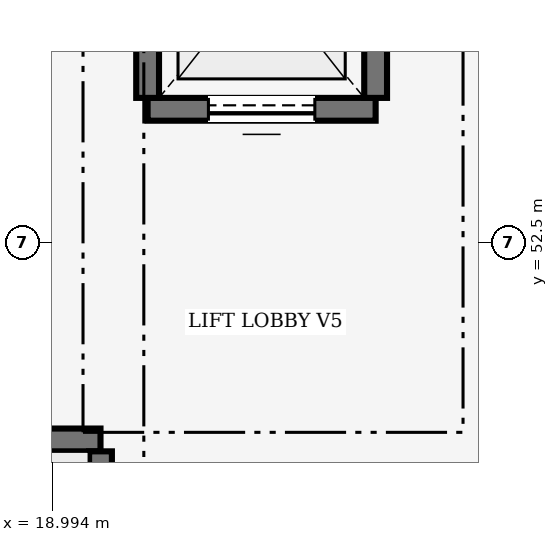
"""IFC4 building model, lengths in metres.
Left out: names, types, materials, properties, quantities, classifications, styles, units other than length and angle.
Written with IfcOpenShell. Run it as: python <this file> out.ifc"""

import sys

from ifc_helpers import new_model, si_unit, direction, frame, frame_2d, origin, place, context, subcontext, project, spatial, rectangle, extrude, element, fill, save


model = new_model("IFC4")
c1 = context("Model", 3, precision=1e-05, world=origin(), true_north=direction((0.0, 1.0)))
c2 = subcontext(c1, "Body", "Model", "MODEL_VIEW")
j1 = project(units=[si_unit("LENGTHUNIT", "METRE"), si_unit("PLANEANGLEUNIT", "RADIAN")], contexts=[c1])
p1 = place(None, origin())
s1 = spatial("IfcSite", under=j1, at=p1, CompositionType="ELEMENT")
p2 = place(p1, origin())
s2 = spatial("IfcBuilding", under=s1, at=p2, CompositionType="ELEMENT")
p3 = place(p2, frame((0.0, 0.0, 12.0)))
s3 = spatial("IfcBuildingStorey", under=s2, at=p3, CompositionType="ELEMENT", Elevation=12.0)
p4 = place(p3, frame((9.45, 49.9, 0.0), z_axis=(0.0, 0.0, 1.0), x_axis=(1.0, 0.0, 0.0)))
e1 = element("IfcWall", 1, at=p4, inside=s3, PredefinedType="SHEAR", context=c2, shape_type="SweptSolid", body=[
    extrude(rectangle(XDim=10.18, YDim=0.3, at=frame_2d((5.09, 0.0))), origin(), (0.0, 0.0, 1.0), 3.35),
])
p5 = place(p3, frame((19.63, 49.75, 0.0), z_axis=(0.0, 0.0, 1.0), x_axis=(0.0, -1.0, 0.0)))
e2 = element("IfcWall", 2, at=p5, inside=s3, PredefinedType="SHEAR", context=c2, shape_type="SweptSolid", body=[
    extrude(rectangle(XDim=4.15, YDim=0.3, at=frame_2d((2.075, 0.0))), origin(), (0.0, 0.0, 1.0), 3.35),
])
p6 = place(p3, frame((23.25, 54.25, 0.0), z_axis=(0.0, 0.0, 1.0), x_axis=(-1.0, 0.0, 0.0)))
e3 = element("IfcWall", 3, at=p6, inside=s3, PredefinedType="SHEAR", context=c2, shape_type="SweptSolid", body=[
    extrude(rectangle(XDim=3.0, YDim=0.3, at=frame_2d((1.5, 0.0))), origin(), (0.0, 0.0, 1.0), 3.35),
])
p7 = place(p6, frame((0.8, 0.0, 0.0)))
e4 = element("IfcOpeningElement", 4, at=p7, cuts=e3, PredefinedType="OPENING", context=c2, shape_type="SweptSolid", body=[
    extrude(rectangle(XDim=1.4, YDim=2.2, at=frame_2d((0.7, 1.1))), frame((0.0, 0.15, 0.0), z_axis=(0.0, -1.0, 0.0), x_axis=(1.0, 0.0, 0.0)), (0.0, 0.0, 1.0), 0.3),
])
for number, where, z_axis, x_axis in (
    (5, (20.25, 54.4, 0.0), (0.0, 0.0, 1.0), (0.0, 1.0, 0.0)),
    (6, (23.25, 57.7, 0.0), (0.0, 0.0, 1.0), (0.0, -1.0, 0.0)),
):
    element("IfcWall", number, at=place(p3, frame(where, z_axis=z_axis, x_axis=x_axis)), inside=s3, PredefinedType="SHEAR", context=c2, shape_type="SweptSolid", body=[
        extrude(rectangle(XDim=3.3, YDim=0.3, at=frame_2d((1.65, 0.0))), origin(), (0.0, 0.0, 1.0), 3.35),
    ])
p8 = place(p7, origin())
e7 = element("IfcDoor", 7, at=p8, inside=s3, OperationType="DOUBLE_DOOR_SLIDING", PredefinedType="DOOR", context=c2, shape_type="SweptSolid", body=[
    extrude(rectangle(XDim=1.4, YDim=2.2, at=frame_2d((0.7, 1.1))), frame((0.0, 0.025, 0.0), z_axis=(0.0, -1.0, 0.0), x_axis=(1.0, 0.0, 0.0)), (0.0, 0.0, 1.0), 0.05),
])
fill(e4, e7)
save(model, sys.argv[1])
